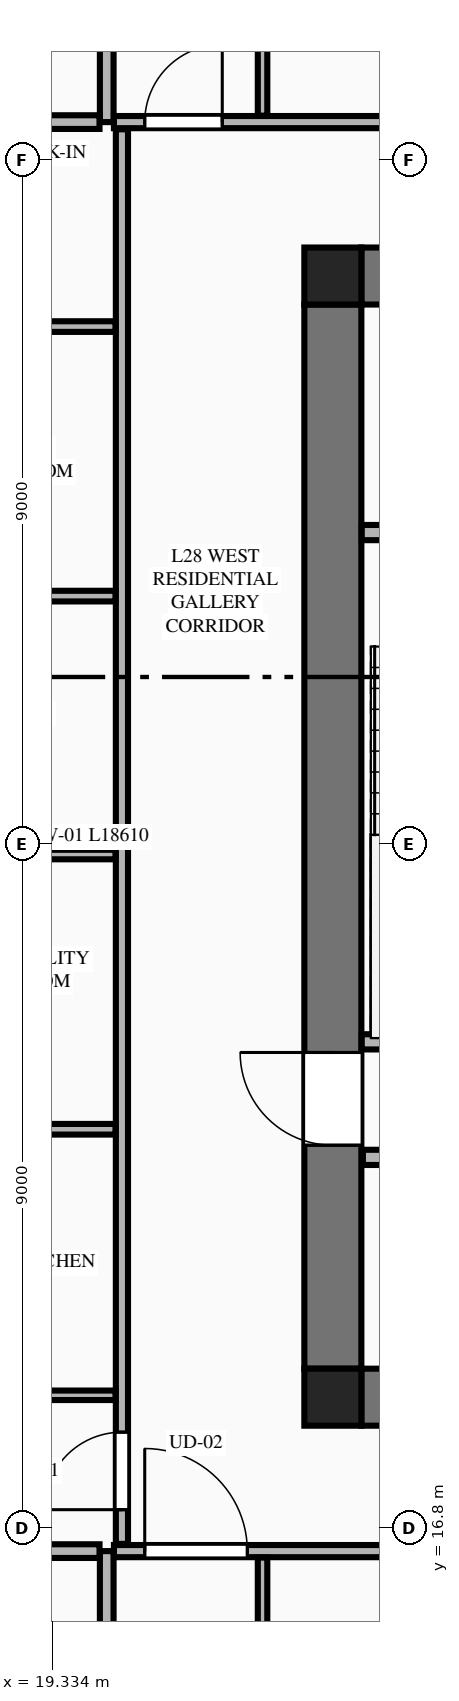
"""IFC4 building model, lengths in metres.
Left out: names, types, materials, properties, quantities, classifications, styles, units other than length and angle.
Written with IfcOpenShell. Run it as: python <this file> out.ifc"""

import sys

from ifc_helpers import new_model, si_unit, direction, frame, frame_2d, origin, origin_2d, place, context, subcontext, project, spatial, rectangle, extrude, element, fill, save


model = new_model("IFC4")
c1 = context("Model", 3, precision=1e-05, world=origin(), true_north=direction((0.0, 1.0)))
c2 = subcontext(c1, "Body", "Model", "MODEL_VIEW")
j1 = project(units=[si_unit("LENGTHUNIT", "METRE"), si_unit("PLANEANGLEUNIT", "RADIAN")], contexts=[c1])
p1 = place(None, origin())
s1 = spatial("IfcSite", under=j1, at=p1, CompositionType="ELEMENT")
p2 = place(p1, origin())
s2 = spatial("IfcBuilding", under=s1, at=p2, CompositionType="ELEMENT")
p3 = place(p2, frame((0.0, 0.0, 109.05)))
s3 = spatial("IfcBuildingStorey", under=s2, at=p3, CompositionType="ELEMENT", Elevation=109.05)
for number, where, z_axis, x_axis in (
    (1, (23.025, 18.525, 0.0), (0.0, 0.0, 1.0), (1.0, 0.0, 0.0)),
    (2, (23.025, 33.275, 0.0), (0.0, 0.0, 1.0), (1.0, 0.0, 0.0)),
):
    element("IfcColumn", number, at=place(p3, frame(where, z_axis=z_axis, x_axis=x_axis)), inside=s3, PredefinedType="COLUMN", context=c2, shape_type="SweptSolid", body=[
        extrude(rectangle(XDim=0.75, YDim=0.75, at=origin_2d()), origin(), (0.0, 0.0, 1.0), 3.55),
    ])
for number, where, z_axis, x_axis in (
    (3, (23.4, 18.525, 0.0), (0.0, 0.0, 1.0), (1.0, 0.0, 0.0)),
    (4, (23.4, 33.275, 0.0), (0.0, 0.0, 1.0), (1.0, 0.0, 0.0)),
):
    element("IfcWall", number, at=place(p3, frame(where, z_axis=z_axis, x_axis=x_axis)), inside=s3, PredefinedType="SHEAR", context=c2, shape_type="SweptSolid", body=[
        extrude(rectangle(XDim=18.0, YDim=0.75, at=frame_2d((9.0, 0.0))), origin(), (0.0, 0.0, 1.0), 3.34),
    ])
p4 = place(p3, frame((23.025, 18.9, 0.0), z_axis=(0.0, 0.0, 1.0), x_axis=(0.0, 1.0, 0.0)))
e5 = element("IfcWall", 5, at=p4, inside=s3, PredefinedType="SHEAR", context=c2, shape_type="SweptSolid", body=[
    extrude(rectangle(XDim=14.0, YDim=0.75, at=frame_2d((7.0, 0.0))), origin(), (0.0, 0.0, 1.0), 3.34),
])
p5 = place(p4, frame((2.94, 0.0, 0.0)))
e6 = element("IfcOpeningElement", 6, at=p5, cuts=e5, PredefinedType="OPENING", context=c2, shape_type="SweptSolid", body=[
    extrude(rectangle(XDim=1.22, YDim=2.25, at=frame_2d((0.61, 1.125))), frame((0.0, 0.385, 0.0), z_axis=(0.0, -1.0, 0.0), x_axis=(1.0, 0.0, 0.0)), (0.0, 0.0, 1.0), 0.77),
])
p6 = place(p3, frame((23.405, 23.2, 0.0), z_axis=(0.0, 0.0, 1.0), x_axis=(1.0, 0.0, 0.0)))
e7 = element("IfcWall", 7, at=p6, inside=s3, PredefinedType="PLUMBINGWALL", context=c2, shape_type="SweptSolid", body=[
    extrude(rectangle(XDim=3.27, YDim=0.2, at=frame_2d((1.635, 0.0))), origin(), (0.0, 0.0, 1.0), 3.34),
])
p7 = place(p3, frame((23.405, 29.9, 0.0), z_axis=(0.0, 0.0, 1.0), x_axis=(1.0, 0.0, 0.0)))
e8 = element("IfcWall", 8, at=p7, inside=s3, PredefinedType="PLUMBINGWALL", context=c2, shape_type="SweptSolid", body=[
    extrude(rectangle(XDim=3.27, YDim=0.2, at=frame_2d((1.635, 0.0))), origin(), (0.0, 0.0, 1.0), 3.34),
])
p8 = place(p7, frame((1.85, 0.0, 0.0)))
e9 = element("IfcOpeningElement", 9, at=p8, cuts=e8, PredefinedType="OPENING", context=c2, shape_type="SweptSolid", body=[
    extrude(rectangle(XDim=0.85, YDim=2.05, at=frame_2d((0.425, 1.025))), frame((0.0, 0.11, 0.0), z_axis=(0.0, -1.0, 0.0), x_axis=(1.0, 0.0, 0.0)), (0.0, 0.0, 1.0), 0.22),
])
p9 = place(p3, frame((23.42, 21.68, 0.0), z_axis=(0.0, 0.0, 1.0), x_axis=(1.0, 0.0, 0.0)))
e10 = element("IfcWall", 10, at=p9, inside=s3, PredefinedType="PLUMBINGWALL", context=c2, shape_type="SweptSolid", body=[
    extrude(rectangle(XDim=17.96, YDim=0.2, at=frame_2d((8.98, 0.0))), origin(), (0.0, 0.0, 1.0), 3.34),
])
p10 = place(p9, frame((11.6, 0.0, 0.0)))
e11 = element("IfcOpeningElement", 11, at=p10, cuts=e10, PredefinedType="OPENING", context=c2, shape_type="SweptSolid", body=[
    extrude(rectangle(XDim=1.1, YDim=2.2, at=frame_2d((0.55, 1.1))), frame((0.0, 0.11, 0.0), z_axis=(0.0, -1.0, 0.0), x_axis=(1.0, 0.0, 0.0)), (0.0, 0.0, 1.0), 0.22),
])
p11 = place(p9, frame((0.41, 0.0, 0.0)))
e12 = element("IfcOpeningElement", 12, at=p11, cuts=e10, PredefinedType="OPENING", context=c2, shape_type="SweptSolid", body=[
    extrude(rectangle(XDim=0.85, YDim=2.05, at=frame_2d((0.425, 1.025))), frame((0.0, 0.11, 0.0), z_axis=(0.0, -1.0, 0.0), x_axis=(1.0, 0.0, 0.0)), (0.0, 0.0, 1.0), 0.22),
])
p12 = place(p9, frame((4.13, 0.0, 0.0)))
e13 = element("IfcOpeningElement", 13, at=p12, cuts=e10, PredefinedType="OPENING", context=c2, shape_type="SweptSolid", body=[
    extrude(rectangle(XDim=0.85, YDim=2.05, at=frame_2d((0.425, 1.025))), frame((0.0, 0.11, 0.0), z_axis=(0.0, -1.0, 0.0), x_axis=(1.0, 0.0, 0.0)), (0.0, 0.0, 1.0), 0.22),
])
p13 = place(p9, frame((7.83, 0.0, 0.0)))
e14 = element("IfcOpeningElement", 14, at=p13, cuts=e10, PredefinedType="OPENING", context=c2, shape_type="SweptSolid", body=[
    extrude(rectangle(XDim=0.85, YDim=2.05, at=frame_2d((0.425, 1.025))), frame((0.0, 0.11, 0.0), z_axis=(0.0, -1.0, 0.0), x_axis=(1.0, 0.0, 0.0)), (0.0, 0.0, 1.0), 0.22),
])
p14 = place(p9, frame((13.78, 0.0, 0.0)))
e15 = element("IfcOpeningElement", 15, at=p14, cuts=e10, PredefinedType="OPENING", context=c2, shape_type="SweptSolid", body=[
    extrude(rectangle(XDim=0.85, YDim=2.05, at=frame_2d((0.425, 1.025))), frame((0.0, 0.11, 0.0), z_axis=(0.0, -1.0, 0.0), x_axis=(1.0, 0.0, 0.0)), (0.0, 0.0, 1.0), 0.22),
])
p15 = place(p9, frame((16.13, 0.0, 0.0)))
e16 = element("IfcOpeningElement", 16, at=p15, cuts=e10, PredefinedType="OPENING", context=c2, shape_type="SweptSolid", body=[
    extrude(rectangle(XDim=0.85, YDim=2.05, at=frame_2d((0.425, 1.025))), frame((0.0, 0.11, 0.0), z_axis=(0.0, -1.0, 0.0), x_axis=(1.0, 0.0, 0.0)), (0.0, 0.0, 1.0), 0.22),
])
p16 = place(p3, frame((20.05, 4.105, 0.0), z_axis=(0.0, 0.0, 1.0), x_axis=(0.0, 1.0, 0.0)))
e17 = element("IfcWall", 17, at=p16, inside=s3, PredefinedType="PARTITIONING", context=c2, shape_type="SweptSolid", body=[
    extrude(rectangle(XDim=12.395, YDim=0.18, at=frame_2d((6.198, 0.0))), origin(), (0.0, 0.0, 1.0), 3.34),
])
p17 = place(p3, frame((20.145, 16.5, 0.0), z_axis=(0.0, 0.0, 1.0), x_axis=(1.0, 0.0, 0.0)))
e18 = element("IfcWall", 18, at=p17, inside=s3, PredefinedType="PARTITIONING", context=c2, shape_type="SweptSolid", body=[
    extrude(rectangle(XDim=15.992, YDim=0.16, at=frame_2d((7.996, 0.0))), origin(), (0.0, 0.0, 1.0), 3.34),
])
p18 = place(p17, frame((0.405, 0.0, 0.0)))
e19 = element("IfcOpeningElement", 19, at=p18, cuts=e18, PredefinedType="OPENING", context=c2, shape_type="SweptSolid", body=[
    extrude(rectangle(XDim=1.35, YDim=2.35, at=frame_2d((0.675, 1.175))), frame((0.0, 0.09, 0.0), z_axis=(0.0, -1.0, 0.0), x_axis=(1.0, 0.0, 0.0)), (0.0, 0.0, 1.0), 0.18),
])
p19 = place(p3, frame((22.1, 10.036, 0.0), z_axis=(0.0, 0.0, 1.0), x_axis=(0.0, 1.0, 0.0)))
e20 = element("IfcWall", 20, at=p19, inside=s3, PredefinedType="PARTITIONING", context=c2, shape_type="SweptSolid", body=[
    extrude(rectangle(XDim=6.379, YDim=0.125, at=frame_2d((3.189, 0.0))), origin(), (0.0, 0.0, 1.0), 2.722),
])
p20 = place(p3, frame((20.05, 35.3, 0.0), z_axis=(0.0, 0.0, 1.0), x_axis=(0.0, 1.0, 0.0)))
e21 = element("IfcWall", 21, at=p20, inside=s3, PredefinedType="PARTITIONING", context=c2, shape_type="SweptSolid", body=[
    extrude(rectangle(XDim=12.195, YDim=0.18, at=frame_2d((6.098, 0.0))), origin(), (0.0, 0.0, 1.0), 3.34),
])
p21 = place(p3, frame((20.145, 35.3, 0.0), z_axis=(0.0, 0.0, 1.0), x_axis=(1.0, 0.0, 0.0)))
e22 = element("IfcWall", 22, at=p21, inside=s3, PredefinedType="PARTITIONING", context=c2, shape_type="SweptSolid", body=[
    extrude(rectangle(XDim=8.328, YDim=0.16, at=frame_2d((4.164, 0.0))), origin(), (0.0, 0.0, 1.0), 3.34),
])
p22 = place(p21, frame((0.405, 0.0, 0.0)))
e23 = element("IfcOpeningElement", 23, at=p22, cuts=e22, PredefinedType="OPENING", context=c2, shape_type="SweptSolid", body=[
    extrude(rectangle(XDim=1.02, YDim=2.25, at=frame_2d((0.51, 1.125))), frame((0.0, 0.09, 0.0), z_axis=(0.0, -1.0, 0.0), x_axis=(1.0, 0.0, 0.0)), (0.0, 0.0, 1.0), 0.18),
])
p23 = place(p3, frame((22.1, 35.385, 0.0), z_axis=(0.0, 0.0, 1.0), x_axis=(0.0, 1.0, 0.0)))
e24 = element("IfcWall", 24, at=p23, inside=s3, PredefinedType="PARTITIONING", context=c2, shape_type="SweptSolid", body=[
    extrude(rectangle(XDim=5.42, YDim=0.125, at=frame_2d((2.71, 0.0))), origin(), (0.0, 0.0, 1.0), 2.722),
])
p24 = place(p3, frame((12.185, 16.5, 0.0), z_axis=(0.0, 0.0, 1.0), x_axis=(1.0, 0.0, 0.0)))
e25 = element("IfcWall", 25, at=p24, inside=s3, PredefinedType="PARTITIONING", context=c2, shape_type="SweptSolid", body=[
    extrude(rectangle(XDim=7.77, YDim=0.18, at=frame_2d((3.885, 0.0))), origin(), (0.0, 0.0, 1.0), 3.34),
])
p25 = place(p3, frame((12.286, 35.3, 0.0), z_axis=(0.0, 0.0, 1.0), x_axis=(1.0, 0.0, 0.0)))
e26 = element("IfcWall", 26, at=p25, inside=s3, PredefinedType="PARTITIONING", context=c2, shape_type="SweptSolid", body=[
    extrude(rectangle(XDim=7.669, YDim=0.18, at=frame_2d((3.834, 0.0))), origin(), (0.0, 0.0, 1.0), 3.34),
])
p26 = place(p3, frame((20.25, 16.595, 0.0), z_axis=(0.0, 0.0, 1.0), x_axis=(0.0, 1.0, 0.0)))
e27 = element("IfcWall", 27, at=p26, inside=s3, PredefinedType="PARTITIONING", context=c2, shape_type="SweptSolid", body=[
    extrude(rectangle(XDim=18.61, YDim=0.16, at=frame_2d((9.305, 0.0))), origin(), (0.0, 0.0, 1.0), 3.34),
])
p27 = place(p26, frame((0.45, 0.0, 0.0)))
e28 = element("IfcOpeningElement", 28, at=p27, cuts=e27, PredefinedType="OPENING", context=c2, shape_type="SweptSolid", body=[
    extrude(rectangle(XDim=1.02, YDim=2.25, at=frame_2d((0.51, 1.125))), frame((0.0, 0.09, 0.0), z_axis=(0.0, -1.0, 0.0), x_axis=(1.0, 0.0, 0.0)), (0.0, 0.0, 1.0), 0.18),
])
p28 = place(p3, frame((16.185, 18.55, 0.0), z_axis=(0.0, 0.0, 1.0), x_axis=(1.0, 0.0, 0.0)))
e29 = element("IfcWall", 29, at=p28, inside=s3, PredefinedType="PARTITIONING", context=c2, shape_type="SweptSolid", body=[
    extrude(rectangle(XDim=3.98, YDim=0.125, at=frame_2d((1.99, 0.0))), origin(), (0.0, 0.0, 1.0), 2.722),
])
for number, where, z_axis, x_axis in (
    (30, (16.185, 29.064, 0.0), (0.0, 0.0, 1.0), (1.0, 0.0, 0.0)),
    (31, (16.185, 22.05, 0.0), (0.0, 0.0, 1.0), (1.0, 0.0, 0.0)),
):
    element("IfcWall", number, at=place(p3, frame(where, z_axis=z_axis, x_axis=x_axis)), inside=s3, PredefinedType="PLUMBINGWALL", context=c2, shape_type="SweptSolid", body=[
        extrude(rectangle(XDim=3.98, YDim=0.14, at=frame_2d((1.99, 0.0))), origin(), (0.0, 0.0, 1.0), 3.34),
    ])
p29 = place(p3, frame((16.185, 25.664, 0.0), z_axis=(0.0, 0.0, 1.0), x_axis=(1.0, 0.0, 0.0)))
e32 = element("IfcWall", 32, at=p29, inside=s3, PredefinedType="PARTITIONING", context=c2, shape_type="SweptSolid", body=[
    extrude(rectangle(XDim=3.98, YDim=0.125, at=frame_2d((1.99, 0.0))), origin(), (0.0, 0.0, 1.0), 3.34),
])
p30 = place(p3, frame((16.185, 32.61, 0.0), z_axis=(0.0, 0.0, 1.0), x_axis=(1.0, 0.0, 0.0)))
e33 = element("IfcWall", 33, at=p30, inside=s3, PredefinedType="PLUMBINGWALL", context=c2, shape_type="SweptSolid", body=[
    extrude(rectangle(XDim=3.98, YDim=0.14, at=frame_2d((1.99, 0.0))), origin(), (0.0, 0.0, 1.0), 3.34),
])
p31 = place(p5, origin())
e34 = element("IfcDoor", 34, at=p31, inside=s3, OperationType="SINGLE_SWING_RIGHT", PredefinedType="DOOR", context=c2, shape_type="SweptSolid", body=[
    extrude(rectangle(XDim=1.22, YDim=2.25, at=frame_2d((0.61, 1.125))), frame((0.0, 0.025, 0.0), z_axis=(0.0, -1.0, 0.0), x_axis=(1.0, 0.0, 0.0)), (0.0, 0.0, 1.0), 0.05),
])
fill(e6, e34)
p32 = place(p18, origin())
e35 = element("IfcDoor", 35, at=p32, inside=s3, OperationType="SINGLE_SWING_LEFT", PredefinedType="DOOR", context=c2, shape_type="SweptSolid", body=[
    extrude(rectangle(XDim=1.35, YDim=2.35, at=frame_2d((0.675, 1.175))), frame((0.0, 0.025, 0.0), z_axis=(0.0, -1.0, 0.0), x_axis=(1.0, 0.0, 0.0)), (0.0, 0.0, 1.0), 0.05),
])
fill(e19, e35)
p33 = place(p22, origin())
e36 = element("IfcDoor", 36, at=p33, inside=s3, OperationType="SINGLE_SWING_RIGHT", PredefinedType="DOOR", context=c2, shape_type="SweptSolid", body=[
    extrude(rectangle(XDim=1.02, YDim=2.25, at=frame_2d((0.51, 1.125))), frame((0.0, 0.025, 0.0), z_axis=(0.0, -1.0, 0.0), x_axis=(1.0, 0.0, 0.0)), (0.0, 0.0, 1.0), 0.05),
])
fill(e23, e36)
p34 = place(p27, origin())
e37 = element("IfcDoor", 37, at=p34, inside=s3, OperationType="SINGLE_SWING_LEFT", PredefinedType="DOOR", context=c2, shape_type="SweptSolid", body=[
    extrude(rectangle(XDim=1.02, YDim=2.25, at=frame_2d((0.51, 1.125))), frame((0.0, 0.025, 0.0), z_axis=(0.0, -1.0, 0.0), x_axis=(1.0, 0.0, 0.0)), (0.0, 0.0, 1.0), 0.05),
])
fill(e28, e37)
save(model, sys.argv[1])
